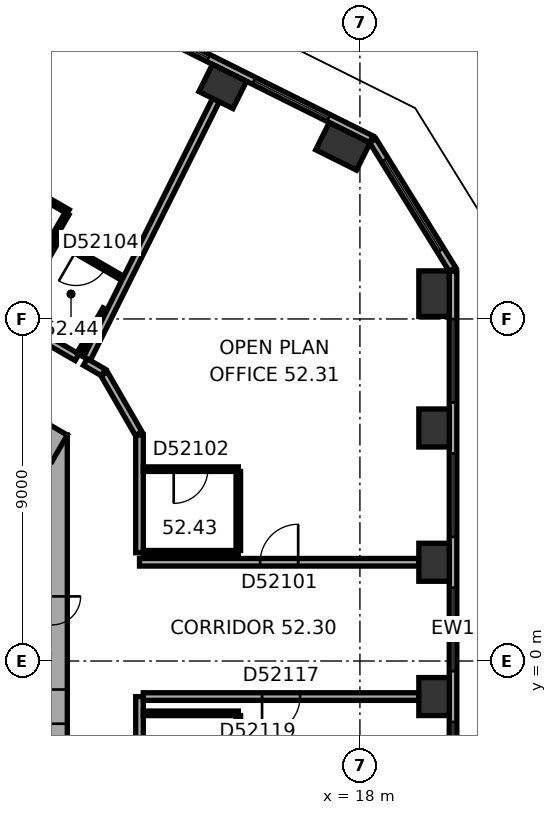
"""IFC4 building model, lengths in metres.
Left out: names, types, materials, properties, quantities, classifications, styles, units other than length and angle.
Written with IfcOpenShell. Run it as: python <this file> out.ifc"""

import sys

from ifc_helpers import new_model, si_unit, direction, frame, frame_2d, origin, origin_2d, place, context, subcontext, project, spatial, rectangle, extrude, element, fill, save


model = new_model("IFC4")
c1 = context("Model", 3, precision=1e-05, world=origin(), true_north=direction((0.0, 1.0)))
c2 = subcontext(c1, "Body", "Model", "MODEL_VIEW")
j1 = project(units=[si_unit("LENGTHUNIT", "METRE"), si_unit("PLANEANGLEUNIT", "RADIAN")], contexts=[c1])
p1 = place(None, origin())
s1 = spatial("IfcSite", under=j1, at=p1, CompositionType="ELEMENT")
p2 = place(p1, origin())
s2 = spatial("IfcBuilding", under=s1, at=p2, CompositionType="ELEMENT")
p3 = place(p2, frame((0.0, 0.0, 210.6)))
s3 = spatial("IfcBuildingStorey", under=s2, at=p3, CompositionType="ELEMENT", Elevation=210.6)
for number, where, z_axis, x_axis in (
    (1, (19.95, -0.936, 0.0), (0.0, 0.0, 1.0), (0.0, 1.0, 0.0)),
    (2, (19.95, 2.598, 0.0), (0.0, 0.0, 1.0), (0.0, 1.0, 0.0)),
    (3, (19.95, 6.132, 0.0), (0.0, 0.0, 1.0), (0.0, 1.0, 0.0)),
):
    element("IfcColumn", number, at=place(p3, frame(where, z_axis=z_axis, x_axis=x_axis)), inside=s3, PredefinedType="COLUMN", context=c2, shape_type="SweptSolid", body=[
        extrude(rectangle(XDim=1.0, YDim=0.8, at=origin_2d()), origin(), (0.0, 0.0, 1.0), 3.7),
    ])
for number, where, z_axis, x_axis in (
    (4, (19.95, 9.665, 0.0), (0.0, 0.0, 1.0), (0.0, 1.0, 0.0)),
    (5, (17.552, 13.541, 0.0), (0.0, 0.0, 1.0), (-0.895, 0.446, 0.0)),
):
    element("IfcColumn", number, at=place(p3, frame(where, z_axis=z_axis, x_axis=x_axis)), inside=s3, PredefinedType="COLUMN", context=c2, shape_type="SweptSolid", body=[
        extrude(rectangle(XDim=1.2, YDim=0.8, at=origin_2d()), origin(), (0.0, 0.0, 1.0), 3.7),
    ])
p4 = place(p3, frame((14.389, 15.118, 0.0), z_axis=(0.0, 0.0, 1.0), x_axis=(-0.894934361602, 0.44619781311, 0.0)))
e6 = element("IfcColumn", 6, at=p4, inside=s3, PredefinedType="COLUMN", context=c2, shape_type="SweptSolid", body=[
    extrude(rectangle(XDim=1.0, YDim=0.8, at=origin_2d()), origin(), (0.0, 0.0, 1.0), 3.7),
])
p5 = place(p3, frame((9.9, -5.947, 0.0), z_axis=(0.0, 0.0, 1.0), x_axis=(0.0, 1.0, 0.0)))
e7 = element("IfcWall", 7, at=p5, inside=s3, PredefinedType="SHEAR", context=c2, shape_type="SweptSolid", body=[
    extrude(rectangle(XDim=11.894, YDim=0.8, at=frame_2d((5.947, 0.0))), origin(), (0.0, 0.0, 1.0), 3.7),
])
p6 = place(p5, frame((6.147, 0.0, 0.0)))
e8 = element("IfcOpeningElement", 8, at=p6, cuts=e7, PredefinedType="OPENING", context=c2, shape_type="SweptSolid", body=[
    extrude(rectangle(XDim=1.5, YDim=2.1, at=frame_2d((0.75, 1.05))), frame((0.0, 0.41, 0.0), z_axis=(0.0, -1.0, 0.0), x_axis=(1.0, 0.0, 0.0)), (0.0, 0.0, 1.0), 0.82),
])
p7 = place(p5, frame((1.697, 0.0, 0.0)))
e9 = element("IfcOpeningElement", 9, at=p7, cuts=e7, PredefinedType="OPENING", context=c2, shape_type="SweptSolid", body=[
    extrude(rectangle(XDim=0.9, YDim=2.1, at=frame_2d((0.45, 1.05))), frame((0.0, 0.41, 0.0), z_axis=(0.0, -1.0, 0.0), x_axis=(1.0, 0.0, 0.0)), (0.0, 0.0, 1.0), 0.82),
])
p8 = place(p5, frame((4.297, 0.0, 0.0)))
e10 = element("IfcOpeningElement", 10, at=p8, cuts=e7, PredefinedType="OPENING", context=c2, shape_type="SweptSolid", body=[
    extrude(rectangle(XDim=0.9, YDim=2.1, at=frame_2d((0.45, 1.05))), frame((0.0, 0.41, 0.0), z_axis=(0.0, -1.0, 0.0), x_axis=(1.0, 0.0, 0.0)), (0.0, 0.0, 1.0), 0.82),
])
p9 = place(p3, frame((10.1, 5.6, 0.0), z_axis=(0.0, 0.0, 1.0), x_axis=(-0.866023897231, 0.500002609418, 0.0)))
e11 = element("IfcWall", 11, at=p9, inside=s3, PredefinedType="SHEAR", context=c2, shape_type="SweptSolid", body=[
    extrude(rectangle(XDim=11.894, YDim=0.8, at=frame_2d((5.947, 0.0))), origin(), (0.0, 0.0, 1.0), 3.7),
])
p10 = place(p9, frame((5.197, 0.0, 0.0)))
e12 = element("IfcOpeningElement", 12, at=p10, cuts=e11, PredefinedType="OPENING", context=c2, shape_type="SweptSolid", body=[
    extrude(rectangle(XDim=0.9, YDim=2.1, at=frame_2d((0.45, 1.05))), frame((0.0, 0.41, 0.0), z_axis=(0.0, -1.0, 0.0), x_axis=(1.0, 0.0, 0.0)), (0.0, 0.0, 1.0), 0.82),
])
p11 = place(p3, frame((20.45, -8.59, 0.0), z_axis=(0.0, 0.0, 1.0), x_axis=(0.0, 1.0, 0.0)))
e13 = element("IfcWall", 13, at=p11, inside=s3, PredefinedType="STANDARD", context=c2, shape_type="SweptSolid", body=[
    extrude(rectangle(XDim=18.841, YDim=0.2, at=frame_2d((9.421, 0.0))), origin(), (0.0, 0.0, 1.0), 3.7),
])
p12 = place(p11, frame((1.254, 0.0, 0.9)))
e14 = element("IfcOpeningElement", 14, at=p12, cuts=e13, PredefinedType="OPENING", context=c2, shape_type="SweptSolid", body=[
    extrude(rectangle(XDim=2.2, YDim=2.0, at=frame_2d((1.1, 1.0))), frame((0.0, 0.11, 0.0), z_axis=(0.0, -1.0, 0.0), x_axis=(1.0, 0.0, 0.0)), (0.0, 0.0, 1.0), 0.22),
])
p13 = place(p11, frame((4.788, 0.0, 0.9)))
e15 = element("IfcOpeningElement", 15, at=p13, cuts=e13, PredefinedType="OPENING", context=c2, shape_type="SweptSolid", body=[
    extrude(rectangle(XDim=2.2, YDim=2.0, at=frame_2d((1.1, 1.0))), frame((0.0, 0.11, 0.0), z_axis=(0.0, -1.0, 0.0), x_axis=(1.0, 0.0, 0.0)), (0.0, 0.0, 1.0), 0.22),
])
p14 = place(p11, frame((8.322, 0.0, 0.9)))
e16 = element("IfcOpeningElement", 16, at=p14, cuts=e13, PredefinedType="OPENING", context=c2, shape_type="SweptSolid", body=[
    extrude(rectangle(XDim=2.2, YDim=2.0, at=frame_2d((1.1, 1.0))), frame((0.0, 0.11, 0.0), z_axis=(0.0, -1.0, 0.0), x_axis=(1.0, 0.0, 0.0)), (0.0, 0.0, 1.0), 0.22),
])
p15 = place(p11, frame((11.855, 0.0, 0.9)))
e17 = element("IfcOpeningElement", 17, at=p15, cuts=e13, PredefinedType="OPENING", context=c2, shape_type="SweptSolid", body=[
    extrude(rectangle(XDim=2.2, YDim=2.0, at=frame_2d((1.1, 1.0))), frame((0.0, 0.11, 0.0), z_axis=(0.0, -1.0, 0.0), x_axis=(1.0, 0.0, 0.0)), (0.0, 0.0, 1.0), 0.22),
])
p16 = place(p11, frame((15.389, 0.0, 0.9)))
e18 = element("IfcOpeningElement", 18, at=p16, cuts=e13, PredefinedType="OPENING", context=c2, shape_type="SweptSolid", body=[
    extrude(rectangle(XDim=2.2, YDim=2.0, at=frame_2d((1.1, 1.0))), frame((0.0, 0.11, 0.0), z_axis=(0.0, -1.0, 0.0), x_axis=(1.0, 0.0, 0.0)), (0.0, 0.0, 1.0), 0.22),
])
p17 = place(p3, frame((20.435, 10.304, 0.0), z_axis=(0.0, 0.0, 1.0), x_axis=(-0.526202661606, 0.850359194058, 0.0)))
e19 = element("IfcWall", 19, at=p17, inside=s3, PredefinedType="STANDARD", context=c2, shape_type="SweptSolid", body=[
    extrude(rectangle(XDim=3.983, YDim=0.2, at=frame_2d((1.991, 0.0))), origin(), (0.0, 0.0, 1.0), 3.7),
])
p18 = place(p17, frame((0.591, 0.0, 0.9)))
e20 = element("IfcOpeningElement", 20, at=p18, cuts=e19, PredefinedType="OPENING", context=c2, shape_type="SweptSolid", body=[
    extrude(rectangle(XDim=2.8, YDim=2.0, at=frame_2d((1.4, 1.0))), frame((0.0, 0.11, 0.0), z_axis=(0.0, -1.0, 0.0), x_axis=(1.0, 0.0, 0.0)), (0.0, 0.0, 1.0), 0.22),
])
p19 = place(p3, frame((18.299, 13.727, 0.0), z_axis=(0.0, 0.0, 1.0), x_axis=(-0.894934554817, 0.44619742558, 0.0)))
e21 = element("IfcWall", 21, at=p19, inside=s3, PredefinedType="STANDARD", context=c2, shape_type="SweptSolid", body=[
    extrude(rectangle(XDim=18.841, YDim=0.2, at=frame_2d((9.421, 0.0))), origin(), (0.0, 0.0, 1.0), 3.7),
])
p20 = place(p19, frame((1.253, 0.0, 0.9)))
e22 = element("IfcOpeningElement", 22, at=p20, cuts=e21, PredefinedType="OPENING", context=c2, shape_type="SweptSolid", body=[
    extrude(rectangle(XDim=2.2, YDim=2.0, at=frame_2d((1.1, 1.0))), frame((0.0, 0.11, 0.0), z_axis=(0.0, -1.0, 0.0), x_axis=(1.0, 0.0, 0.0)), (0.0, 0.0, 1.0), 0.22),
])
p21 = place(p19, frame((4.786, 0.0, 0.9)))
e23 = element("IfcOpeningElement", 23, at=p21, cuts=e21, PredefinedType="OPENING", context=c2, shape_type="SweptSolid", body=[
    extrude(rectangle(XDim=2.2, YDim=2.0, at=frame_2d((1.1, 1.0))), frame((0.0, 0.11, 0.0), z_axis=(0.0, -1.0, 0.0), x_axis=(1.0, 0.0, 0.0)), (0.0, 0.0, 1.0), 0.22),
])
p22 = place(p19, frame((8.32, 0.0, 0.9)))
e24 = element("IfcOpeningElement", 24, at=p22, cuts=e21, PredefinedType="OPENING", context=c2, shape_type="SweptSolid", body=[
    extrude(rectangle(XDim=2.2, YDim=2.0, at=frame_2d((1.1, 1.0))), frame((0.0, 0.11, 0.0), z_axis=(0.0, -1.0, 0.0), x_axis=(1.0, 0.0, 0.0)), (0.0, 0.0, 1.0), 0.22),
])
p23 = place(p19, frame((11.854, 0.0, 0.9)))
e25 = element("IfcOpeningElement", 25, at=p23, cuts=e21, PredefinedType="OPENING", context=c2, shape_type="SweptSolid", body=[
    extrude(rectangle(XDim=2.2, YDim=2.0, at=frame_2d((1.1, 1.0))), frame((0.0, 0.11, 0.0), z_axis=(0.0, -1.0, 0.0), x_axis=(1.0, 0.0, 0.0)), (0.0, 0.0, 1.0), 0.22),
])
p24 = place(p19, frame((15.387, 0.0, 0.9)))
e26 = element("IfcOpeningElement", 26, at=p24, cuts=e21, PredefinedType="OPENING", context=c2, shape_type="SweptSolid", body=[
    extrude(rectangle(XDim=2.2, YDim=2.0, at=frame_2d((1.1, 1.0))), frame((0.0, 0.11, 0.0), z_axis=(0.0, -1.0, 0.0), x_axis=(1.0, 0.0, 0.0)), (0.0, 0.0, 1.0), 0.22),
])
p25 = place(p3, frame((7.948, 13.193, 0.0), z_axis=(0.0, 0.0, 1.0), x_axis=(0.866019409031, -0.500010383074, 0.0)))
e27 = element("IfcWall", 27, at=p25, inside=s3, PredefinedType="PARTITIONING", context=c2, shape_type="SweptSolid", body=[
    extrude(rectangle(XDim=2.74, YDim=0.12, at=frame_2d((1.37, 0.0))), origin(), (0.0, 0.0, 1.0), 3.35),
])
p26 = place(p3, frame((8.875, 9.079, 0.0), z_axis=(0.0, 0.0, 1.0), x_axis=(0.499998129301, 0.86602648383, 0.0)))
e28 = element("IfcWall", 28, at=p26, inside=s3, PredefinedType="PARTITIONING", context=c2, shape_type="SweptSolid", body=[
    extrude(rectangle(XDim=2.3, YDim=0.12, at=frame_2d((1.15, 0.0))), origin(), (0.0, 0.0, 1.0), 3.35),
])
p27 = place(p3, frame((10.077, 11.04, 0.0), z_axis=(0.0, 0.0, 1.0), x_axis=(0.866043088465, -0.499969367985, 0.0)))
e29 = element("IfcWall", 29, at=p27, inside=s3, PredefinedType="PARTITIONING", context=c2, shape_type="SweptSolid", body=[
    extrude(rectangle(XDim=1.94, YDim=0.12, at=frame_2d((0.97, 0.0))), origin(), (0.0, 0.0, 1.0), 3.35),
])
p28 = place(p27, frame((0.52, 0.0, 0.0)))
e30 = element("IfcOpeningElement", 30, at=p28, cuts=e29, PredefinedType="OPENING", context=c2, shape_type="SweptSolid", body=[
    extrude(rectangle(XDim=0.9, YDim=2.1, at=frame_2d((0.45, 1.05))), frame((0.0, 0.07, 0.0), z_axis=(0.0, -1.0, 0.0), x_axis=(1.0, 0.0, 0.0)), (0.0, 0.0, 1.0), 0.14),
])
p29 = place(p3, frame((10.292, 11.771, 0.0), z_axis=(0.0, 0.0, 1.0), x_axis=(-0.500026023896, -0.86601037836, 0.0)))
e31 = element("IfcWall", 31, at=p29, inside=s3, PredefinedType="PARTITIONING", context=c2, shape_type="SweptSolid", body=[
    extrude(rectangle(XDim=3.04, YDim=0.12, at=frame_2d((1.52, 0.0))), origin(), (0.0, 0.0, 1.0), 3.35),
])
p30 = place(p3, frame((10.558, 7.992, 0.0), z_axis=(0.0, 0.0, 1.0), x_axis=(-0.866041268327, 0.499972520799, 0.0)))
e32 = element("IfcWall", 32, at=p30, inside=s3, PredefinedType="PARTITIONING", context=c2, shape_type="SweptSolid", body=[
    extrude(rectangle(XDim=2.0, YDim=0.2, at=frame_2d((1.0, 0.0))), origin(), (0.0, 0.0, 1.0), 3.35),
])
p31 = place(p3, frame((11.25, 7.592, 0.0), z_axis=(0.0, 0.0, 1.0), x_axis=(-0.865993292597, 0.500055614084, 0.0)))
e33 = element("IfcWall", 33, at=p31, inside=s3, PredefinedType="PARTITIONING", context=c2, shape_type="SweptSolid", body=[
    extrude(rectangle(XDim=0.55, YDim=0.2, at=frame_2d((0.275, 0.0))), origin(), (0.0, 0.0, 1.0), 3.35),
])
p32 = place(p3, frame((11.291, 9.263, 0.0), z_axis=(0.0, 0.0, 1.0), x_axis=(-0.500036664704, -0.866004234373, 0.0)))
e34 = element("IfcWall", 34, at=p32, inside=s3, PredefinedType="PARTITIONING", context=c2, shape_type="SweptSolid", body=[
    extrude(rectangle(XDim=1.368, YDim=0.12, at=frame_2d((0.684, 0.0))), origin(), (0.0, 0.0, 1.0), 3.35),
])
p33 = place(p3, frame((12.18, 5.981, 0.0), z_axis=(0.0, 0.0, 1.0), x_axis=(-0.499904359745, 0.86608061467, 0.0)))
e35 = element("IfcWall", 35, at=p33, inside=s3, PredefinedType="PARTITIONING", context=c2, shape_type="SweptSolid", body=[
    extrude(rectangle(XDim=1.82, YDim=0.2, at=frame_2d((0.91, 0.0))), origin(), (0.0, 0.0, 1.0), 3.35),
])
p34 = place(p3, frame((12.2, -3.577, 0.0), z_axis=(0.0, 0.0, 1.0), x_axis=(0.0, 1.0, 0.0)))
e36 = element("IfcWall", 36, at=p34, inside=s3, PredefinedType="PARTITIONING", context=c2, shape_type="SweptSolid", body=[
    extrude(rectangle(XDim=2.641, YDim=0.2, at=frame_2d((1.321, 0.0))), origin(), (0.0, 0.0, 1.0), 3.35),
])
p35 = place(p3, frame((12.2, 2.848, 0.0), z_axis=(0.0, 0.0, 1.0), x_axis=(0.0, 1.0, 0.0)))
e37 = element("IfcWall", 37, at=p35, inside=s3, PredefinedType="PARTITIONING", context=c2, shape_type="SweptSolid", body=[
    extrude(rectangle(XDim=3.099, YDim=0.2, at=frame_2d((1.549, 0.0))), origin(), (0.0, 0.0, 1.0), 3.35),
])
p36 = place(p3, frame((12.3, -1.377, 0.0), z_axis=(0.0, 0.0, 1.0), x_axis=(1.0, 0.0, 0.0)))
e38 = element("IfcWall", 38, at=p36, inside=s3, PredefinedType="PARTITIONING", context=c2, shape_type="SweptSolid", body=[
    extrude(rectangle(XDim=2.5, YDim=0.12, at=frame_2d((1.25, 0.0))), origin(), (0.0, 0.0, 1.0), 3.35),
])
p37 = place(p3, frame((12.3, -0.936, 0.0), z_axis=(0.0, 0.0, 1.0), x_axis=(1.0, 0.0, 0.0)))
e39 = element("IfcWall", 39, at=p37, inside=s3, PredefinedType="PARTITIONING", context=c2, shape_type="SweptSolid", body=[
    extrude(rectangle(XDim=7.25, YDim=0.2, at=frame_2d((3.625, 0.0))), origin(), (0.0, 0.0, 1.0), 2.65),
])
p38 = place(p37, frame((3.125, 0.0, 0.0)))
e40 = element("IfcOpeningElement", 40, at=p38, cuts=e39, PredefinedType="OPENING", context=c2, shape_type="SweptSolid", body=[
    extrude(rectangle(XDim=1.0, YDim=2.1, at=frame_2d((0.5, 1.05))), frame((0.0, 0.11, 0.0), z_axis=(0.0, -1.0, 0.0), x_axis=(1.0, 0.0, 0.0)), (0.0, 0.0, 1.0), 0.22),
])
p39 = place(p3, frame((12.3, 5.048, 0.0), z_axis=(0.0, 0.0, 1.0), x_axis=(1.0, 0.0, 0.0)))
e41 = element("IfcWall", 41, at=p39, inside=s3, PredefinedType="PARTITIONING", context=c2, shape_type="SweptSolid", body=[
    extrude(rectangle(XDim=2.5, YDim=0.12, at=frame_2d((1.25, 0.0))), origin(), (0.0, 0.0, 1.0), 3.35),
])
p40 = place(p39, frame((0.8, 0.0, 0.0)))
e42 = element("IfcOpeningElement", 42, at=p40, cuts=e41, PredefinedType="OPENING", context=c2, shape_type="SweptSolid", body=[
    extrude(rectangle(XDim=0.9, YDim=2.1, at=frame_2d((0.45, 1.05))), frame((0.0, 0.07, 0.0), z_axis=(0.0, -1.0, 0.0), x_axis=(1.0, 0.0, 0.0)), (0.0, 0.0, 1.0), 0.14),
])
p41 = place(p3, frame((14.211, 14.76, 0.0), z_axis=(0.0, 0.0, 1.0), x_axis=(-0.446198490295, -0.89493402397, 0.0)))
e43 = element("IfcWall", 43, at=p41, inside=s3, PredefinedType="PARTITIONING", context=c2, shape_type="SweptSolid", body=[
    extrude(rectangle(XDim=7.602, YDim=0.2, at=frame_2d((3.801, 0.0))), origin(), (0.0, 0.0, 1.0), 3.35),
])
p42 = place(p3, frame((14.8, -1.437, 0.0), z_axis=(0.0, 0.0, 1.0), x_axis=(0.0, -1.0, 0.0)))
e44 = element("IfcWall", 44, at=p42, inside=s3, PredefinedType="PARTITIONING", context=c2, shape_type="SweptSolid", body=[
    extrude(rectangle(XDim=2.08, YDim=0.12, at=frame_2d((1.04, 0.0))), origin(), (0.0, 0.0, 1.0), 3.35),
])
p43 = place(p42, frame((0.59, 0.0, 0.0)))
e45 = element("IfcOpeningElement", 45, at=p43, cuts=e44, PredefinedType="OPENING", context=c2, shape_type="SweptSolid", body=[
    extrude(rectangle(XDim=0.9, YDim=2.1, at=frame_2d((0.45, 1.05))), frame((0.0, 0.07, 0.0), z_axis=(0.0, -1.0, 0.0), x_axis=(1.0, 0.0, 0.0)), (0.0, 0.0, 1.0), 0.14),
])
p44 = place(p3, frame((14.8, 2.848, 0.0), z_axis=(0.0, 0.0, 1.0), x_axis=(-1.0, 0.0, 0.0)))
e46 = element("IfcWall", 46, at=p44, inside=s3, PredefinedType="PARTITIONING", context=c2, shape_type="SweptSolid", body=[
    extrude(rectangle(XDim=2.5, YDim=0.12, at=frame_2d((1.25, 0.0))), origin(), (0.0, 0.0, 1.0), 3.35),
])
p45 = place(p3, frame((14.8, 4.988, 0.0), z_axis=(0.0, 0.0, 1.0), x_axis=(0.0, -1.0, 0.0)))
e47 = element("IfcWall", 47, at=p45, inside=s3, PredefinedType="PARTITIONING", context=c2, shape_type="SweptSolid", body=[
    extrude(rectangle(XDim=2.08, YDim=0.12, at=frame_2d((1.04, 0.0))), origin(), (0.0, 0.0, 1.0), 3.35),
])
p46 = place(p3, frame((19.55, 2.598, 0.0), z_axis=(0.0, 0.0, 1.0), x_axis=(-1.0, 0.0, 0.0)))
e48 = element("IfcWall", 48, at=p46, inside=s3, PredefinedType="PARTITIONING", context=c2, shape_type="SweptSolid", body=[
    extrude(rectangle(XDim=7.35, YDim=0.2, at=frame_2d((3.675, 0.0))), origin(), (0.0, 0.0, 1.0), 3.35),
])
p47 = place(p46, frame((3.175, 0.0, 0.0)))
e49 = element("IfcOpeningElement", 49, at=p47, cuts=e48, PredefinedType="OPENING", context=c2, shape_type="SweptSolid", body=[
    extrude(rectangle(XDim=1.0, YDim=2.1, at=frame_2d((0.5, 1.05))), frame((0.0, 0.11, 0.0), z_axis=(0.0, -1.0, 0.0), x_axis=(1.0, 0.0, 0.0)), (0.0, 0.0, 1.0), 0.22),
])
p48 = place(p13, origin())
e50 = element("IfcWindow", 50, at=p48, inside=s3, PartitioningType="SINGLE_PANEL", PredefinedType="WINDOW", context=c2, shape_type="SweptSolid", body=[
    extrude(rectangle(XDim=2.2, YDim=2.0, at=frame_2d((1.1, 1.0))), frame((0.0, 0.03, 0.0), z_axis=(0.0, -1.0, 0.0), x_axis=(1.0, 0.0, 0.0)), (0.0, 0.0, 1.0), 0.06),
])
fill(e15, e50)
p49 = place(p14, origin())
e51 = element("IfcWindow", 51, at=p49, inside=s3, PartitioningType="SINGLE_PANEL", PredefinedType="WINDOW", context=c2, shape_type="SweptSolid", body=[
    extrude(rectangle(XDim=2.2, YDim=2.0, at=frame_2d((1.1, 1.0))), frame((0.0, 0.03, 0.0), z_axis=(0.0, -1.0, 0.0), x_axis=(1.0, 0.0, 0.0)), (0.0, 0.0, 1.0), 0.06),
])
fill(e16, e51)
p50 = place(p15, origin())
e52 = element("IfcWindow", 52, at=p50, inside=s3, PartitioningType="SINGLE_PANEL", PredefinedType="WINDOW", context=c2, shape_type="SweptSolid", body=[
    extrude(rectangle(XDim=2.2, YDim=2.0, at=frame_2d((1.1, 1.0))), frame((0.0, 0.03, 0.0), z_axis=(0.0, -1.0, 0.0), x_axis=(1.0, 0.0, 0.0)), (0.0, 0.0, 1.0), 0.06),
])
fill(e17, e52)
p51 = place(p16, origin())
e53 = element("IfcWindow", 53, at=p51, inside=s3, PartitioningType="SINGLE_PANEL", PredefinedType="WINDOW", context=c2, shape_type="SweptSolid", body=[
    extrude(rectangle(XDim=2.2, YDim=2.0, at=frame_2d((1.1, 1.0))), frame((0.0, 0.03, 0.0), z_axis=(0.0, -1.0, 0.0), x_axis=(1.0, 0.0, 0.0)), (0.0, 0.0, 1.0), 0.06),
])
fill(e18, e53)
p52 = place(p18, origin())
e54 = element("IfcWindow", 54, at=p52, inside=s3, PartitioningType="SINGLE_PANEL", PredefinedType="WINDOW", context=c2, shape_type="SweptSolid", body=[
    extrude(rectangle(XDim=2.8, YDim=2.0, at=frame_2d((1.4, 1.0))), frame((0.0, 0.03, 0.0), z_axis=(0.0, -1.0, 0.0), x_axis=(1.0, 0.0, 0.0)), (0.0, 0.0, 1.0), 0.06),
])
fill(e20, e54)
p53 = place(p20, origin())
e55 = element("IfcWindow", 55, at=p53, inside=s3, PartitioningType="SINGLE_PANEL", PredefinedType="WINDOW", context=c2, shape_type="SweptSolid", body=[
    extrude(rectangle(XDim=2.2, YDim=2.0, at=frame_2d((1.1, 1.0))), frame((0.0, 0.03, 0.0), z_axis=(0.0, -1.0, 0.0), x_axis=(1.0, 0.0, 0.0)), (0.0, 0.0, 1.0), 0.06),
])
fill(e22, e55)
p54 = place(p21, origin())
e56 = element("IfcWindow", 56, at=p54, inside=s3, PartitioningType="SINGLE_PANEL", PredefinedType="WINDOW", context=c2, shape_type="SweptSolid", body=[
    extrude(rectangle(XDim=2.2, YDim=2.0, at=frame_2d((1.1, 1.0))), frame((0.0, 0.03, 0.0), z_axis=(0.0, -1.0, 0.0), x_axis=(1.0, 0.0, 0.0)), (0.0, 0.0, 1.0), 0.06),
])
fill(e23, e56)
p55 = place(p6, origin())
e57 = element("IfcDoor", 57, at=p55, inside=s3, OperationType="DOUBLE_DOOR_SINGLE_SWING", PredefinedType="DOOR", context=c2, shape_type="SweptSolid", body=[
    extrude(rectangle(XDim=1.5, YDim=2.1, at=frame_2d((0.75, 1.05))), frame((0.0, 0.025, 0.0), z_axis=(0.0, -1.0, 0.0), x_axis=(1.0, 0.0, 0.0)), (0.0, 0.0, 1.0), 0.05),
])
fill(e8, e57)
p56 = place(p8, origin())
e58 = element("IfcDoor", 58, at=p56, inside=s3, OperationType="SINGLE_SWING_LEFT", PredefinedType="DOOR", context=c2, shape_type="SweptSolid", body=[
    extrude(rectangle(XDim=0.9, YDim=2.1, at=frame_2d((0.45, 1.05))), frame((0.0, 0.025, 0.0), z_axis=(0.0, -1.0, 0.0), x_axis=(1.0, 0.0, 0.0)), (0.0, 0.0, 1.0), 0.05),
])
fill(e10, e58)
p57 = place(p47, origin())
e59 = element("IfcDoor", 59, at=p57, inside=s3, OperationType="SINGLE_SWING_LEFT", PredefinedType="DOOR", context=c2, shape_type="SweptSolid", body=[
    extrude(rectangle(XDim=1.0, YDim=2.1, at=frame_2d((0.5, 1.05))), frame((0.0, 0.025, 0.0), z_axis=(0.0, -1.0, 0.0), x_axis=(1.0, 0.0, 0.0)), (0.0, 0.0, 1.0), 0.05),
])
fill(e49, e59)
p58 = place(p40, origin())
e60 = element("IfcDoor", 60, at=p58, inside=s3, OperationType="SINGLE_SWING_LEFT", PredefinedType="DOOR", context=c2, shape_type="SweptSolid", body=[
    extrude(rectangle(XDim=0.9, YDim=2.1, at=frame_2d((0.45, 1.05))), frame((0.0, 0.025, 0.0), z_axis=(0.0, -1.0, 0.0), x_axis=(1.0, 0.0, 0.0)), (0.0, 0.0, 1.0), 0.05),
])
fill(e42, e60)
p59 = place(p28, origin())
e61 = element("IfcDoor", 61, at=p59, inside=s3, OperationType="SINGLE_SWING_LEFT", PredefinedType="DOOR", context=c2, shape_type="SweptSolid", body=[
    extrude(rectangle(XDim=0.9, YDim=2.1, at=frame_2d((0.45, 1.05))), frame((0.0, 0.025, 0.0), z_axis=(0.0, -1.0, 0.0), x_axis=(1.0, 0.0, 0.0)), (0.0, 0.0, 1.0), 0.05),
])
fill(e30, e61)
p60 = place(p38, origin())
e62 = element("IfcDoor", 62, at=p60, inside=s3, OperationType="SINGLE_SWING_LEFT", PredefinedType="DOOR", context=c2, shape_type="SweptSolid", body=[
    extrude(rectangle(XDim=1.0, YDim=2.1, at=frame_2d((0.5, 1.05))), frame((0.0, 0.025, 0.0), z_axis=(0.0, -1.0, 0.0), x_axis=(1.0, 0.0, 0.0)), (0.0, 0.0, 1.0), 0.05),
])
fill(e40, e62)
save(model, sys.argv[1])
